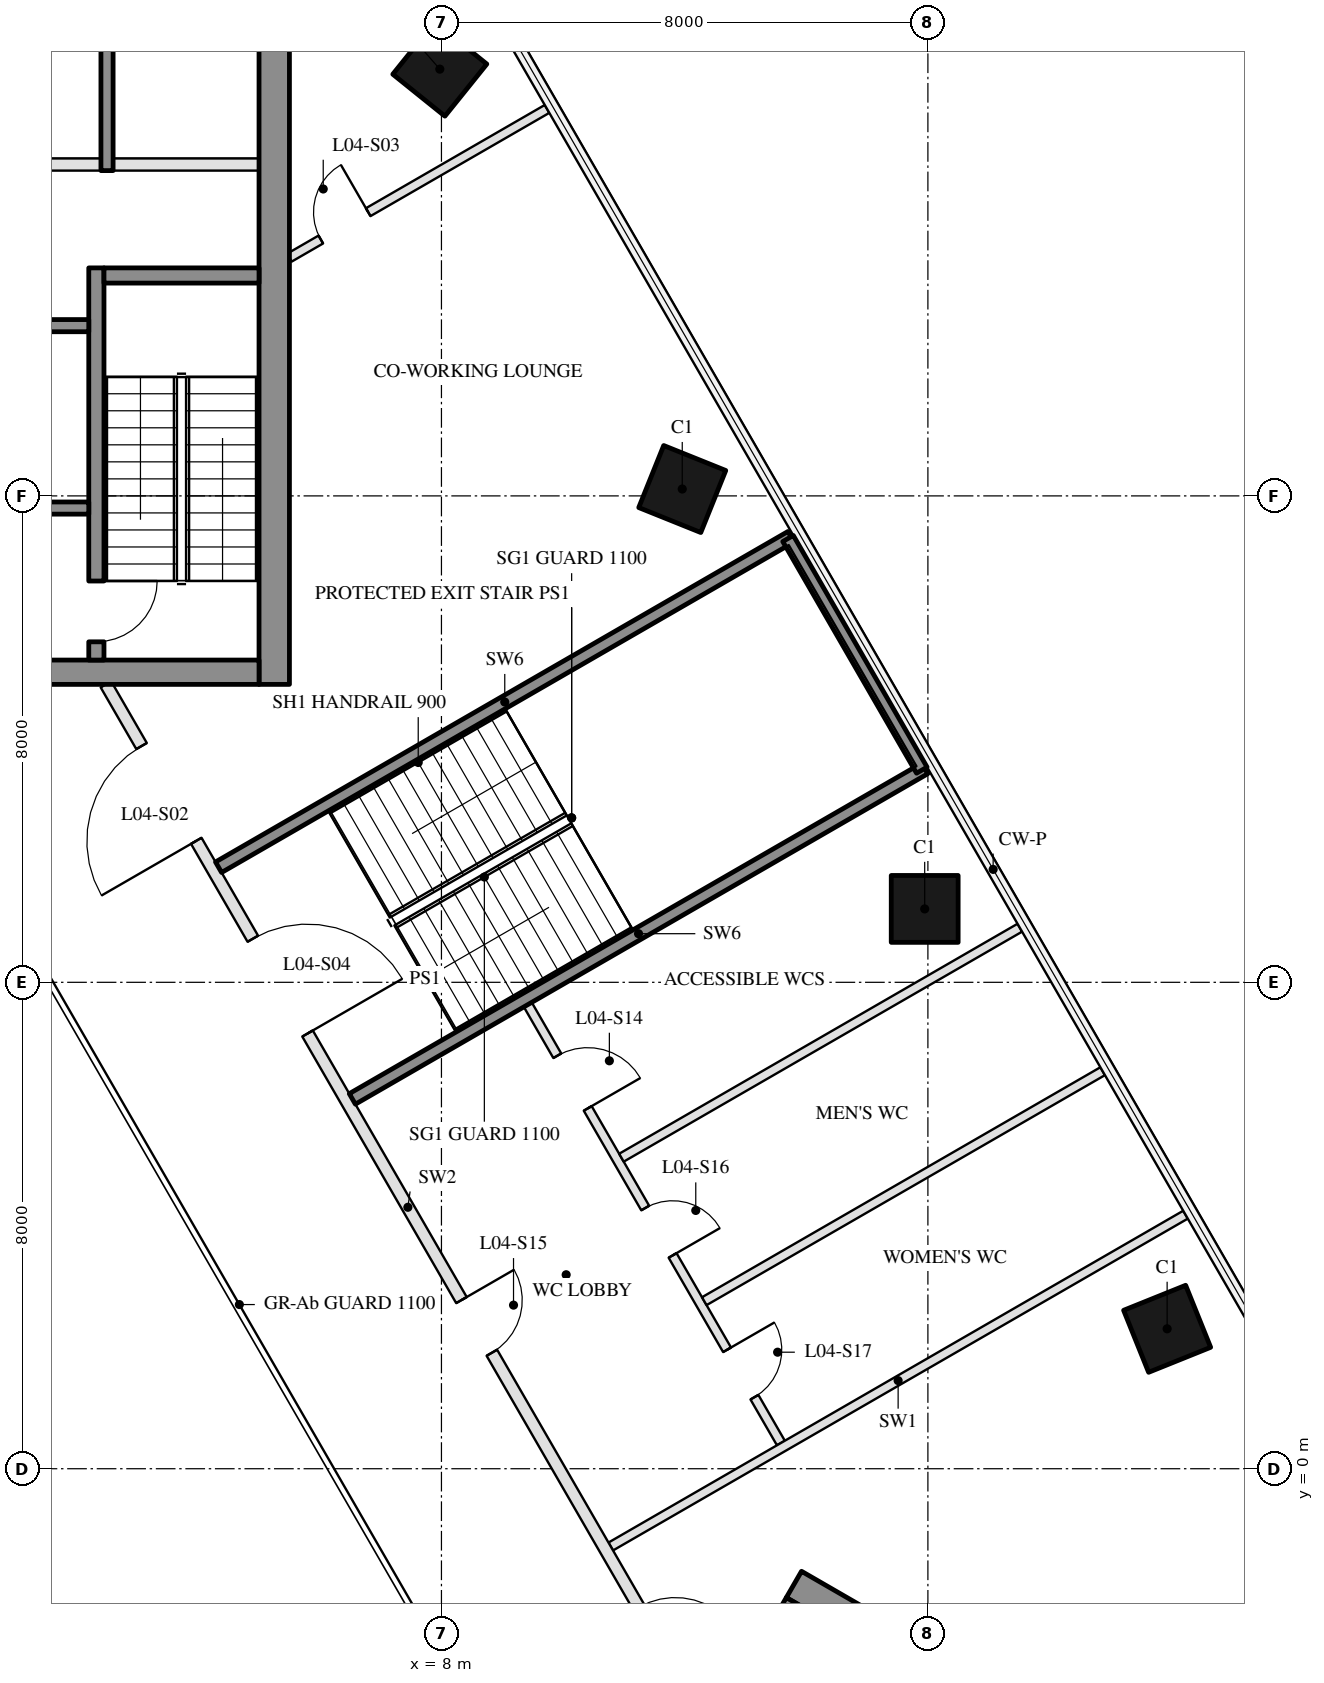
"""IFC4 building model, lengths in metres.
Left out: names, types, materials, properties, quantities, classifications, styles, units other than length and angle.
Written with IfcOpenShell. Run it as: python <this file> out.ifc"""

import sys

from ifc_helpers import new_model, si_unit, direction, frame, frame_2d, origin, origin_2d, place, context, subcontext, project, spatial, rectangle, hollow_rectangle, extrude, boolean, halfspace, element, fill, save


model = new_model("IFC4")
c1 = context("Model", 3, precision=1e-05, world=origin(), true_north=direction((0.0, 1.0)))
c2 = subcontext(c1, "Body", "Model", "MODEL_VIEW")
j1 = project(units=[si_unit("LENGTHUNIT", "METRE"), si_unit("PLANEANGLEUNIT", "RADIAN")], contexts=[c1])
p1 = place(None, origin())
s1 = spatial("IfcSite", under=j1, at=p1, CompositionType="ELEMENT")
p2 = place(p1, origin())
s2 = spatial("IfcBuilding", under=s1, at=p2, CompositionType="ELEMENT")
p3 = place(p2, frame((0.0, 0.0, 28.5)))
s3 = spatial("IfcBuildingStorey", under=s2, at=p3, CompositionType="ELEMENT", Elevation=28.5)
p4 = place(p3, frame((19.934, 2.301, 0.0), z_axis=(-0.032751169552, -0.004609022205, 0.999452909249), x_axis=(0.499064961058, -0.866476451895, 0.012358112959)))
e1 = element("IfcColumn", 1, at=p4, inside=s3, PredefinedType="COLUMN", context=c2, shape_type="SweptSolid", body=[
    boolean("DIFFERENCE", boolean("DIFFERENCE", extrude(hollow_rectangle(XDim=1.1, YDim=1.1, WallThickness=0.05, at=origin_2d()), origin(), (0.0, 0.0, 1.0), 4.502), halfspace(frame((0.0, 0.0, 0.011), z_axis=(0.0, 0.0, 1.0), x_axis=(1.0, 0.0, 0.0)), True)), halfspace(frame((0.0, 0.0, 4.492), z_axis=(0.0, 0.0, 1.0), x_axis=(1.0, 0.0, 0.0)), False)),
])
p5 = place(p3, frame((15.947, 9.207, 0.0), z_axis=(-0.026625850327, -0.015400695505, 0.999526829391), x_axis=(-0.500507531384, 0.865732182021, 6.442154e-06)))
e2 = element("IfcColumn", 2, at=p5, inside=s3, PredefinedType="COLUMN", context=c2, shape_type="SweptSolid", body=[
    boolean("DIFFERENCE", boolean("DIFFERENCE", extrude(hollow_rectangle(XDim=1.1, YDim=1.1, WallThickness=0.05, at=origin_2d()), origin(), (0.0, 0.0, 1.0), 4.502), halfspace(frame((0.0, 0.0, 0.01), z_axis=(0.0, 0.0, 1.0), x_axis=(1.0, 0.0, 0.0)), True)), halfspace(frame((0.0, 0.0, 4.492), z_axis=(0.0, 0.0, 1.0), x_axis=(1.0, 0.0, 0.0)), False)),
])
p6 = place(p3, frame((11.96, 16.113, 0.0), z_axis=(-0.020388124423, -0.026081616616, 0.999451886614), x_axis=(-0.501064231638, 0.865321827993, 0.012360006954)))
e3 = element("IfcColumn", 3, at=p6, inside=s3, PredefinedType="COLUMN", context=c2, shape_type="SweptSolid", body=[
    boolean("DIFFERENCE", boolean("DIFFERENCE", extrude(hollow_rectangle(XDim=1.1, YDim=1.1, WallThickness=0.05, at=origin_2d()), origin(), (0.0, 0.0, 1.0), 4.502), halfspace(frame((0.0, 0.0, 0.011), z_axis=(0.0, 0.0, 1.0), x_axis=(1.0, 0.0, 0.0)), True)), halfspace(frame((0.0, 0.0, 4.492), z_axis=(0.0, 0.0, 1.0), x_axis=(1.0, 0.0, 0.0)), False)),
])
p7 = place(p3, frame((7.973, 23.019, 0.0), z_axis=(-0.014257598898, -0.036701119596, 0.999224573704), x_axis=(-0.499479314293, 0.865974198785, 0.024679984425)))
e4 = element("IfcColumn", 4, at=p7, inside=s3, PredefinedType="COLUMN", context=c2, shape_type="SweptSolid", body=[
    boolean("DIFFERENCE", boolean("DIFFERENCE", extrude(hollow_rectangle(XDim=1.1, YDim=1.1, WallThickness=0.05, at=origin_2d()), origin(), (0.0, 0.0, 1.0), 4.503), halfspace(frame((0.0, 0.0, 0.013), z_axis=(0.0, 0.0, 1.0), x_axis=(1.0, 0.0, 0.0)), True)), halfspace(frame((0.0, 0.0, 4.491), z_axis=(0.0, 0.0, 1.0), x_axis=(1.0, 0.0, 0.0)), False)),
])
p8 = place(p3, frame((5.25, 12.9, 0.0), z_axis=(0.0, 0.0, 1.0), x_axis=(0.0, 1.0, 0.0)))
e5 = element("IfcWall", 5, at=p8, inside=s3, PredefinedType="SHEAR", context=c2, shape_type="SweptSolid", body=[
    extrude(rectangle(XDim=15.13, YDim=0.5, at=frame_2d((7.565, 0.0))), origin(), (0.0, 0.0, 1.0), 4.2),
])
p9 = place(p3, frame((5.0, 13.1, 0.0), z_axis=(0.0, 0.0, 1.0), x_axis=(-1.0, 0.0, 0.0)))
e6 = element("IfcWall", 6, at=p9, inside=s3, PredefinedType="SHEAR", context=c2, shape_type="SweptSolid", body=[
    extrude(rectangle(XDim=10.0, YDim=0.4, at=frame_2d((5.0, 0.0))), origin(), (0.0, 0.0, 1.0), 4.2),
])
p10 = place(p9, frame((3.55, 0.0, 0.0)))
e7 = element("IfcOpeningElement", 7, at=p10, cuts=e6, PredefinedType="OPENING", context=c2, shape_type="SweptSolid", body=[
    extrude(rectangle(XDim=1.1, YDim=2.1, at=frame_2d((0.55, 1.05))), frame((0.0, 0.21, 0.0), z_axis=(0.0, -1.0, 0.0), x_axis=(1.0, 0.0, 0.0)), (0.0, 0.0, 1.0), 0.42),
])
p11 = place(p9, frame((5.85, 0.0, 0.0)))
e8 = element("IfcOpeningElement", 8, at=p11, cuts=e6, PredefinedType="OPENING", context=c2, shape_type="SweptSolid", body=[
    extrude(rectangle(XDim=1.4, YDim=2.1, at=frame_2d((0.7, 1.05))), frame((0.0, 0.21, 0.0), z_axis=(0.0, -1.0, 0.0), x_axis=(1.0, 0.0, 0.0)), (0.0, 0.0, 1.0), 0.42),
])
p12 = place(p3, frame((2.325, 13.3, 0.0), z_axis=(0.0, 0.0, 1.0), x_axis=(0.0, 1.0, 0.0)))
e9 = element("IfcWall", 9, at=p12, inside=s3, PredefinedType="SHEAR", context=c2, shape_type="SweptSolid", body=[
    extrude(rectangle(XDim=6.45, YDim=0.25, at=frame_2d((3.225, 0.0))), origin(), (0.0, 0.0, 1.0), 4.2),
])
p13 = place(p12, frame((0.3, 0.0, 0.0)))
e10 = element("IfcOpeningElement", 10, at=p13, cuts=e9, PredefinedType="OPENING", context=c2, shape_type="SweptSolid", body=[
    extrude(rectangle(XDim=1.0, YDim=2.1, at=frame_2d((0.5, 1.05))), frame((0.0, 0.135, 0.0), z_axis=(0.0, -1.0, 0.0), x_axis=(1.0, 0.0, 0.0)), (0.0, 0.0, 1.0), 0.27),
])
p14 = place(p3, frame((5.0, 19.625, 0.0), z_axis=(0.0, 0.0, 1.0), x_axis=(-1.0, 0.0, 0.0)))
e11 = element("IfcWall", 11, at=p14, inside=s3, PredefinedType="SHEAR", context=c2, shape_type="SweptSolid", body=[
    extrude(rectangle(XDim=2.55, YDim=0.25, at=frame_2d((1.275, 0.0))), origin(), (0.0, 0.0, 1.0), 4.2),
])
p15 = place(p3, frame((2.2, 18.8, 0.0), z_axis=(0.0, 0.0, 1.0), x_axis=(-1.0, 0.0, 0.0)))
e12 = element("IfcWall", 12, at=p15, inside=s3, PredefinedType="SHEAR", context=c2, shape_type="SweptSolid", body=[
    extrude(rectangle(XDim=2.8, YDim=0.2, at=frame_2d((1.4, 0.0))), origin(), (0.0, 0.0, 1.0), 4.2),
])
p16 = place(p3, frame((2.2, 15.8, 0.0), z_axis=(0.0, 0.0, 1.0), x_axis=(-1.0, 0.0, 0.0)))
e13 = element("IfcWall", 13, at=p16, inside=s3, PredefinedType="SHEAR", context=c2, shape_type="SweptSolid", body=[
    extrude(rectangle(XDim=2.8, YDim=0.2, at=frame_2d((1.4, 0.0))), origin(), (0.0, 0.0, 1.0), 4.2),
])
p17 = place(p16, frame((0.7, 0.0, 0.0)))
e14 = element("IfcOpeningElement", 14, at=p17, cuts=e13, PredefinedType="OPENING", context=c2, shape_type="SweptSolid", body=[
    extrude(rectangle(XDim=1.2, YDim=2.1, at=frame_2d((0.6, 1.05))), frame((0.0, 0.11, 0.0), z_axis=(0.0, -1.0, 0.0), x_axis=(1.0, 0.0, 0.0)), (0.0, 0.0, 1.0), 0.22),
])
p18 = place(p3, frame((2.5, 21.35, 0.0), z_axis=(0.0, 0.0, 1.0), x_axis=(0.0, 1.0, 0.0)))
e15 = element("IfcWall", 15, at=p18, inside=s3, PredefinedType="SHEAR", context=c2, shape_type="SweptSolid", body=[
    extrude(rectangle(XDim=2.8, YDim=0.2, at=frame_2d((1.4, 0.0))), origin(), (0.0, 0.0, 1.0), 4.2),
])
p19 = place(p3, frame((5.0, 21.45, 0.0), z_axis=(0.0, 0.0, 1.0), x_axis=(-1.0, 0.0, 0.0)))
e16 = element("IfcWall", 16, at=p19, inside=s3, PredefinedType="PARTITIONING", context=c2, shape_type="SweptSolid", body=[
    extrude(rectangle(XDim=2.4, YDim=0.2, at=frame_2d((1.2, 0.0))), origin(), (0.0, 0.0, 1.0), 4.2),
])
p20 = place(p3, frame((2.4, 21.45, 0.0), z_axis=(0.0, 0.0, 1.0), x_axis=(-1.0, 0.0, 0.0)))
e17 = element("IfcWall", 17, at=p20, inside=s3, PredefinedType="PARTITIONING", context=c2, shape_type="SweptSolid", body=[
    extrude(rectangle(XDim=2.8, YDim=0.2, at=frame_2d((1.4, 0.0))), origin(), (0.0, 0.0, 1.0), 4.2),
])
p21 = place(p3, frame((13.797, -1.903, 0.0), z_axis=(0.0, 0.0, 1.0), x_axis=(0.866025168306, -0.500000407861, 0.0)))
e18 = element("IfcWall", 18, at=p21, inside=s3, PredefinedType="SHEAR", context=c2, shape_type="SweptSolid", body=[
    extrude(rectangle(XDim=15.13, YDim=0.5, at=frame_2d((7.565, 0.0))), origin(), (0.0, 0.0, 1.0), 4.2),
])
p22 = place(p3, frame((8.845, -10.88, 0.0), z_axis=(0.0, 0.0, 1.0), x_axis=(0.500004234368, 0.866022959057, 0.0)))
e19 = element("IfcWall", 19, at=p22, inside=s3, PredefinedType="SHEAR", context=c2, shape_type="SweptSolid", body=[
    extrude(rectangle(XDim=10.0, YDim=0.4, at=frame_2d((5.0, 0.0))), origin(), (0.0, 0.0, 1.0), 4.2),
])
p23 = place(p22, frame((3.55, 0.0, 0.0)))
e20 = element("IfcOpeningElement", 20, at=p23, cuts=e19, PredefinedType="OPENING", context=c2, shape_type="SweptSolid", body=[
    extrude(rectangle(XDim=1.1, YDim=2.1, at=frame_2d((0.55, 1.05))), frame((0.0, 0.21, 0.0), z_axis=(0.0, -1.0, 0.0), x_axis=(1.0, 0.0, 0.0)), (0.0, 0.0, 1.0), 0.42),
])
p24 = place(p22, frame((5.85, 0.0, 0.0)))
e21 = element("IfcOpeningElement", 21, at=p24, cuts=e19, PredefinedType="OPENING", context=c2, shape_type="SweptSolid", body=[
    extrude(rectangle(XDim=1.4, YDim=2.1, at=frame_2d((0.7, 1.05))), frame((0.0, 0.21, 0.0), z_axis=(0.0, -1.0, 0.0), x_axis=(1.0, 0.0, 0.0)), (0.0, 0.0, 1.0), 0.42),
])
p25 = place(p3, frame((13.583, 0.423, 0.0), z_axis=(0.0, 0.0, 1.0), x_axis=(-0.500005920892, 0.866021985329, 0.0)))
e22 = element("IfcWall", 22, at=p25, inside=s3, PredefinedType="PARTITIONING", context=c2, shape_type="SweptSolid", body=[
    extrude(rectangle(XDim=8.325, YDim=0.15, at=frame_2d((4.163, 0.0))), origin(), (0.0, 0.0, 1.0), 3.41),
])
p26 = place(p25, frame((6.354, 0.0, 0.0)))
e23 = element("IfcOpeningElement", 23, at=p26, cuts=e22, PredefinedType="OPENING", context=c2, shape_type="SweptSolid", body=[
    extrude(rectangle(XDim=1.0, YDim=2.1, at=frame_2d((0.5, 1.05))), frame((0.0, 0.085, 0.0), z_axis=(0.0, -1.0, 0.0), x_axis=(1.0, 0.0, 0.0)), (0.0, 0.0, 1.0), 0.17),
])
p27 = place(p25, frame((3.562, 0.0, 0.0)))
e24 = element("IfcOpeningElement", 24, at=p27, cuts=e22, PredefinedType="OPENING", context=c2, shape_type="SweptSolid", body=[
    extrude(rectangle(XDim=0.9, YDim=2.1, at=frame_2d((0.45, 1.05))), frame((0.0, 0.085, 0.0), z_axis=(0.0, -1.0, 0.0), x_axis=(1.0, 0.0, 0.0)), (0.0, 0.0, 1.0), 0.17),
])
p28 = place(p25, frame((0.871, 0.0, 0.0)))
e25 = element("IfcOpeningElement", 25, at=p28, cuts=e22, PredefinedType="OPENING", context=c2, shape_type="SweptSolid", body=[
    extrude(rectangle(XDim=0.9, YDim=2.1, at=frame_2d((0.45, 1.05))), frame((0.0, 0.085, 0.0), z_axis=(0.0, -1.0, 0.0), x_axis=(1.0, 0.0, 0.0)), (0.0, 0.0, 1.0), 0.17),
])
p29 = place(p3, frame((20.237, 4.178, 0.0), z_axis=(0.0, 0.0, 1.0), x_axis=(-0.866022430415, -0.500005149991, 0.0)))
e26 = element("IfcWall", 26, at=p29, inside=s3, PredefinedType="PARTITIONING", context=c2, shape_type="SweptSolid", body=[
    extrude(rectangle(XDim=10.915, YDim=0.15, at=frame_2d((5.457, 0.0))), origin(), (0.0, 0.0, 1.0), 3.6),
])
p30 = place(p3, frame((18.874, 6.538, 0.0), z_axis=(0.0, 0.0, 1.0), x_axis=(-0.866028121412, -0.499995292902, 0.0)))
e27 = element("IfcWall", 27, at=p30, inside=s3, PredefinedType="PARTITIONING", context=c2, shape_type="SweptSolid", body=[
    extrude(rectangle(XDim=7.565, YDim=0.15, at=frame_2d((3.782, 0.0))), origin(), (0.0, 0.0, 1.0), 3.41),
])
p31 = place(p3, frame((17.511, 8.898, 0.0), z_axis=(0.0, 0.0, 1.0), x_axis=(-0.866028121412, -0.499995292902, 0.0)))
e28 = element("IfcWall", 28, at=p31, inside=s3, PredefinedType="PARTITIONING", context=c2, shape_type="SweptSolid", body=[
    extrude(rectangle(XDim=7.565, YDim=0.15, at=frame_2d((3.782, 0.0))), origin(), (0.0, 0.0, 1.0), 3.6),
])
for number, where, z_axis, x_axis in (
    (29, (15.948, 11.517, 0.0), (0.0, 0.0, 1.0), (-0.866, -0.5, 0.0)),
    (30, (13.748, 15.328, 0.0), (0.0, 0.0, 1.0), (-0.866, -0.5, 0.0)),
):
    element("IfcWall", number, at=place(p3, frame(where, z_axis=z_axis, x_axis=x_axis)), inside=s3, PredefinedType="SOLIDWALL", context=c2, shape_type="SweptSolid", body=[
        extrude(rectangle(XDim=10.87, YDim=0.2, at=frame_2d((5.435, 0.0))), origin(), (0.0, 0.0, 1.0), 4.2),
    ])
p32 = place(p3, frame((9.737, 22.365, 0.0), z_axis=(0.0, 0.0, 1.0), x_axis=(-0.866020200517, -0.500009012216, 0.0)))
e31 = element("IfcWall", 31, at=p32, inside=s3, PredefinedType="PARTITIONING", context=c2, shape_type="SweptSolid", body=[
    extrude(rectangle(XDim=4.892, YDim=0.15, at=frame_2d((2.446, 0.0))), origin(), (0.0, 0.0, 1.0), 3.6),
])
p33 = place(p32, frame((3.396, 0.0, 0.0)))
e32 = element("IfcOpeningElement", 32, at=p33, cuts=e31, PredefinedType="OPENING", context=c2, shape_type="SweptSolid", body=[
    extrude(rectangle(XDim=0.9, YDim=2.1, at=frame_2d((0.45, 1.05))), frame((0.0, 0.085, 0.0), z_axis=(0.0, -1.0, 0.0), x_axis=(1.0, 0.0, 0.0)), (0.0, 0.0, 1.0), 0.17),
])
p34 = place(p3, frame((12.413, -4.3, 0.0), z_axis=(0.0, 0.0, 1.0), x_axis=(-0.50000478328, 0.866022642139, 0.0)))
e33 = element("IfcWall", 33, at=p34, inside=s3, PredefinedType="PARTITIONING", context=c2, shape_type="SweptSolid", body=[
    extrude(rectangle(XDim=19.861, YDim=0.2, at=frame_2d((9.931, 0.0))), origin(), (0.0, 0.0, 1.0), 3.41),
])
p35 = place(p34, frame((1.134, 0.0, 0.0)))
e34 = element("IfcOpeningElement", 34, at=p35, cuts=e33, PredefinedType="OPENING", context=c2, shape_type="SweptSolid", body=[
    extrude(rectangle(XDim=1.2, YDim=2.1, at=frame_2d((0.6, 1.05))), frame((0.0, 0.11, 0.0), z_axis=(0.0, -1.0, 0.0), x_axis=(1.0, 0.0, 0.0)), (0.0, 0.0, 1.0), 0.22),
])
p36 = place(p34, frame((16.89, 0.0, 0.0)))
e35 = element("IfcOpeningElement", 35, at=p36, cuts=e33, PredefinedType="OPENING", context=c2, shape_type="SweptSolid", body=[
    extrude(rectangle(XDim=1.8, YDim=2.4, at=frame_2d((0.9, 1.2))), frame((0.0, 0.11, 0.0), z_axis=(0.0, -1.0, 0.0), x_axis=(1.0, 0.0, 0.0)), (0.0, 0.0, 1.0), 0.22),
])
p37 = place(p34, frame((13.23, 0.0, 0.0)))
e36 = element("IfcOpeningElement", 36, at=p37, cuts=e33, PredefinedType="OPENING", context=c2, shape_type="SweptSolid", body=[
    extrude(rectangle(XDim=1.8, YDim=2.1, at=frame_2d((0.9, 1.05))), frame((0.0, 0.11, 0.0), z_axis=(0.0, -1.0, 0.0), x_axis=(1.0, 0.0, 0.0)), (0.0, 0.0, 1.0), 0.22),
])
p38 = place(p34, frame((7.168, 0.0, 0.0)))
e37 = element("IfcOpeningElement", 37, at=p38, cuts=e33, PredefinedType="OPENING", context=c2, shape_type="SweptSolid", body=[
    extrude(rectangle(XDim=1.0, YDim=2.1, at=frame_2d((0.5, 1.05))), frame((0.0, 0.11, 0.0), z_axis=(0.0, -1.0, 0.0), x_axis=(1.0, 0.0, 0.0)), (0.0, 0.0, 1.0), 0.22),
])
p39 = place(p3, frame((15.9, 11.489, 0.0), z_axis=(0.0, 0.0, 1.0), x_axis=(-0.499988222896, 0.866032203192, 0.0)))
e38 = element("IfcWall", 38, at=p39, inside=s3, PredefinedType="SOLIDWALL", context=c2, shape_type="SweptSolid", body=[
    extrude(rectangle(XDim=4.4, YDim=0.2, at=frame_2d((2.2, 0.0))), origin(), (0.0, 0.0, 1.0), 4.2),
])
p40 = place(p13, frame((1.0, 0.0, 0.0), z_axis=(0.0, 0.0, 1.0), x_axis=(-1.0, 0.0, 0.0)))
e39 = element("IfcDoor", 39, at=p40, inside=s3, OperationType="SINGLE_SWING_LEFT", PredefinedType="DOOR", context=c2, shape_type="SweptSolid", body=[
    extrude(rectangle(XDim=1.0, YDim=2.1, at=frame_2d((0.5, 1.05))), frame((0.0, 0.025, 0.0), z_axis=(0.0, -1.0, 0.0), x_axis=(1.0, 0.0, 0.0)), (0.0, 0.0, 1.0), 0.05),
])
fill(e10, e39)
p41 = place(p36, origin())
e40 = element("IfcDoor", 40, at=p41, inside=s3, OperationType="DOUBLE_DOOR_SINGLE_SWING", PredefinedType="DOOR", context=c2, shape_type="SweptSolid", body=[
    extrude(rectangle(XDim=1.8, YDim=2.4, at=frame_2d((0.9, 1.2))), frame((0.0, 0.025, 0.0), z_axis=(0.0, -1.0, 0.0), x_axis=(1.0, 0.0, 0.0)), (0.0, 0.0, 1.0), 0.05),
])
fill(e35, e40)
p42 = place(p33, frame((0.9, 0.0, 0.0), z_axis=(0.0, 0.0, 1.0), x_axis=(-1.0, 0.0, 0.0)))
e41 = element("IfcDoor", 41, at=p42, inside=s3, OperationType="SINGLE_SWING_RIGHT", PredefinedType="DOOR", context=c2, shape_type="SweptSolid", body=[
    extrude(rectangle(XDim=0.9, YDim=2.1, at=frame_2d((0.45, 1.05))), frame((0.0, 0.025, 0.0), z_axis=(0.0, -1.0, 0.0), x_axis=(1.0, 0.0, 0.0)), (0.0, 0.0, 1.0), 0.05),
])
fill(e32, e41)
p43 = place(p37, frame((1.8, 0.0, 0.0), z_axis=(0.0, 0.0, 1.0), x_axis=(-1.0, 0.0, 0.0)))
e42 = element("IfcDoor", 42, at=p43, inside=s3, OperationType="DOUBLE_DOOR_SINGLE_SWING", PredefinedType="DOOR", context=c2, shape_type="SweptSolid", body=[
    extrude(rectangle(XDim=1.8, YDim=2.1, at=frame_2d((0.9, 1.05))), frame((0.0, 0.025, 0.0), z_axis=(0.0, -1.0, 0.0), x_axis=(1.0, 0.0, 0.0)), (0.0, 0.0, 1.0), 0.05),
])
fill(e36, e42)
p44 = place(p26, frame((1.0, 0.0, 0.0), z_axis=(0.0, 0.0, 1.0), x_axis=(-1.0, 0.0, 0.0)))
e43 = element("IfcDoor", 43, at=p44, inside=s3, OperationType="SINGLE_SWING_RIGHT", PredefinedType="DOOR", context=c2, shape_type="SweptSolid", body=[
    extrude(rectangle(XDim=1.0, YDim=2.1, at=frame_2d((0.5, 1.05))), frame((0.0, 0.025, 0.0), z_axis=(0.0, -1.0, 0.0), x_axis=(1.0, 0.0, 0.0)), (0.0, 0.0, 1.0), 0.05),
])
fill(e23, e43)
p45 = place(p38, frame((1.0, 0.0, 0.0), z_axis=(0.0, 0.0, 1.0), x_axis=(-1.0, 0.0, 0.0)))
e44 = element("IfcDoor", 44, at=p45, inside=s3, OperationType="SINGLE_SWING_LEFT", PredefinedType="DOOR", context=c2, shape_type="SweptSolid", body=[
    extrude(rectangle(XDim=1.0, YDim=2.1, at=frame_2d((0.5, 1.05))), frame((0.0, 0.025, 0.0), z_axis=(0.0, -1.0, 0.0), x_axis=(1.0, 0.0, 0.0)), (0.0, 0.0, 1.0), 0.05),
])
fill(e37, e44)
p46 = place(p27, frame((0.9, 0.0, 0.0), z_axis=(0.0, 0.0, 1.0), x_axis=(-1.0, 0.0, 0.0)))
e45 = element("IfcDoor", 45, at=p46, inside=s3, OperationType="SINGLE_SWING_RIGHT", PredefinedType="DOOR", context=c2, shape_type="SweptSolid", body=[
    extrude(rectangle(XDim=0.9, YDim=2.1, at=frame_2d((0.45, 1.05))), frame((0.0, 0.025, 0.0), z_axis=(0.0, -1.0, 0.0), x_axis=(1.0, 0.0, 0.0)), (0.0, 0.0, 1.0), 0.05),
])
fill(e24, e45)
p47 = place(p28, frame((0.9, 0.0, 0.0), z_axis=(0.0, 0.0, 1.0), x_axis=(-1.0, 0.0, 0.0)))
e46 = element("IfcDoor", 46, at=p47, inside=s3, OperationType="SINGLE_SWING_LEFT", PredefinedType="DOOR", context=c2, shape_type="SweptSolid", body=[
    extrude(rectangle(XDim=0.9, YDim=2.1, at=frame_2d((0.45, 1.05))), frame((0.0, 0.025, 0.0), z_axis=(0.0, -1.0, 0.0), x_axis=(1.0, 0.0, 0.0)), (0.0, 0.0, 1.0), 0.05),
])
fill(e25, e46)
save(model, sys.argv[1])
